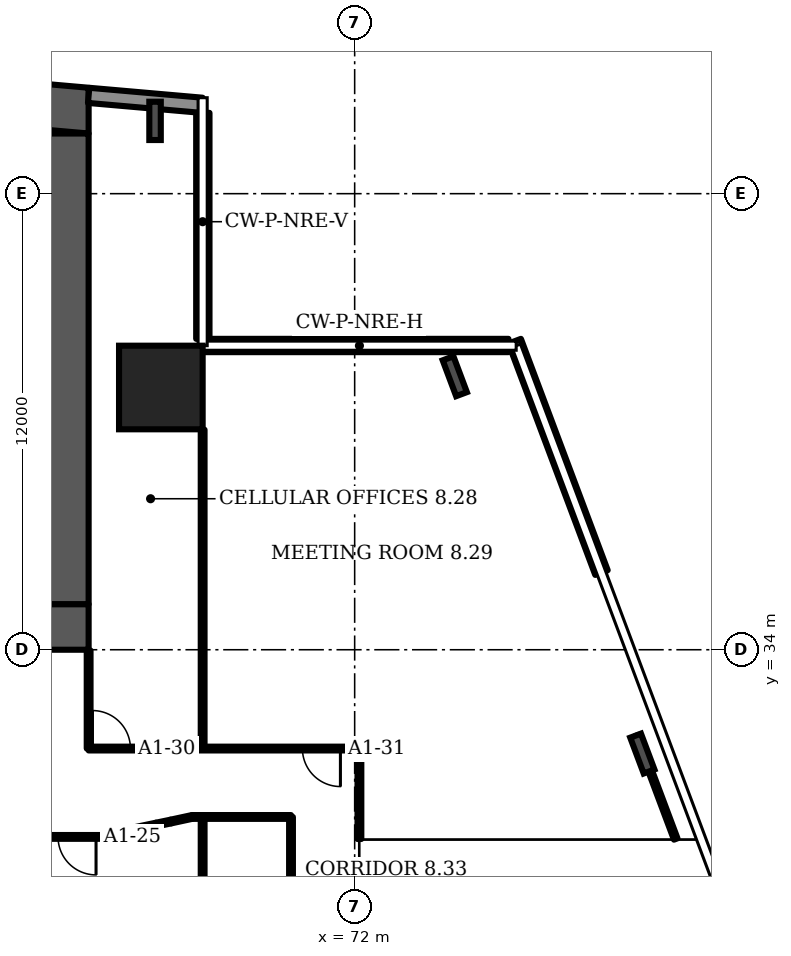
"""IFC4 building model, lengths in metres.
Left out: names, types, materials, properties, quantities, classifications, styles, units other than length and angle.
Written with IfcOpenShell. Run it as: python <this file> out.ifc"""

import sys

from ifc_helpers import new_model, si_unit, direction, frame, frame_2d, origin, origin_2d, place, context, subcontext, project, spatial, polyline, rectangle, i_section, outline, extrude, element, fill, save


model = new_model("IFC4")
c1 = context("Model", 3, precision=1e-05, world=origin(), true_north=direction((0.0, 1.0)))
c2 = subcontext(c1, "Body", "Model", "MODEL_VIEW")
j1 = project(units=[si_unit("LENGTHUNIT", "METRE"), si_unit("PLANEANGLEUNIT", "RADIAN")], contexts=[c1])
p1 = place(None, origin())
s1 = spatial("IfcSite", under=j1, at=p1, CompositionType="ELEMENT")
p2 = place(p1, origin())
s2 = spatial("IfcBuilding", under=s1, at=p2, CompositionType="ELEMENT")
p3 = place(p2, frame((0.0, 0.0, 48.7)))
s3 = spatial("IfcBuildingStorey", under=s2, at=p3, CompositionType="ELEMENT", Elevation=48.7)
p4 = place(p3, origin())
e1 = element("IfcWall", 1, at=p4, inside=s3, PredefinedType="SHEAR", context=c2, shape_type="SweptSolid", body=[
    extrude(outline(polyline([(9.0, 47.583), (37.0, 50.032), (65.0, 47.583), (65.0, 48.787), (37.0, 51.237), (9.0, 48.787), (9.0, 47.583)])), origin(), (0.0, 0.0, 1.0), 3.6),
])
p5 = place(p3, frame((9.0, 34.6, 0.0), z_axis=(0.0, 0.0, 1.0), x_axis=(1.0, 0.0, 0.0)))
e2 = element("IfcWall", 2, at=p5, inside=s3, PredefinedType="SHEAR", context=c2, shape_type="SweptSolid", body=[
    extrude(rectangle(XDim=56.0, YDim=1.2, at=frame_2d((28.0, 0.0))), origin(), (0.0, 0.0, 1.0), 3.6),
])
p6 = place(p5, frame((3.3, 0.0, 0.0)))
e3 = element("IfcOpeningElement", 3, at=p6, cuts=e2, PredefinedType="OPENING", context=c2, shape_type="SweptSolid", body=[
    extrude(rectangle(XDim=1.0, YDim=2.1, at=frame_2d((0.5, 1.05))), frame((0.0, 0.61, 0.0), z_axis=(0.0, -1.0, 0.0), x_axis=(1.0, 0.0, 0.0)), (0.0, 0.0, 1.0), 1.22),
])
p7 = place(p5, frame((7.867, 0.0, 0.0)))
e4 = element("IfcOpeningElement", 4, at=p7, cuts=e2, PredefinedType="OPENING", context=c2, shape_type="SweptSolid", body=[
    extrude(rectangle(XDim=1.1, YDim=2.1, at=frame_2d((0.55, 1.05))), frame((0.0, 0.61, 0.0), z_axis=(0.0, -1.0, 0.0), x_axis=(1.0, 0.0, 0.0)), (0.0, 0.0, 1.0), 1.22),
])
p8 = place(p5, frame((12.033, 0.0, 0.0)))
e5 = element("IfcOpeningElement", 5, at=p8, cuts=e2, PredefinedType="OPENING", context=c2, shape_type="SweptSolid", body=[
    extrude(rectangle(XDim=1.1, YDim=2.1, at=frame_2d((0.55, 1.05))), frame((0.0, 0.61, 0.0), z_axis=(0.0, -1.0, 0.0), x_axis=(1.0, 0.0, 0.0)), (0.0, 0.0, 1.0), 1.22),
])
p9 = place(p5, frame((9.8, 0.0, 0.0)))
e6 = element("IfcOpeningElement", 6, at=p9, cuts=e2, PredefinedType="OPENING", context=c2, shape_type="SweptSolid", body=[
    extrude(rectangle(XDim=1.4, YDim=2.1, at=frame_2d((0.7, 1.05))), frame((0.0, 0.61, 0.0), z_axis=(0.0, -1.0, 0.0), x_axis=(1.0, 0.0, 0.0)), (0.0, 0.0, 1.0), 1.22),
])
p10 = place(p5, frame((14.65, 0.0, 0.0)))
e7 = element("IfcOpeningElement", 7, at=p10, cuts=e2, PredefinedType="OPENING", context=c2, shape_type="SweptSolid", body=[
    extrude(rectangle(XDim=1.2, YDim=2.1, at=frame_2d((0.6, 1.05))), frame((0.0, 0.61, 0.0), z_axis=(0.0, -1.0, 0.0), x_axis=(1.0, 0.0, 0.0)), (0.0, 0.0, 1.0), 1.22),
])
p11 = place(p5, frame((21.867, 0.0, 0.0)))
e8 = element("IfcOpeningElement", 8, at=p11, cuts=e2, PredefinedType="OPENING", context=c2, shape_type="SweptSolid", body=[
    extrude(rectangle(XDim=1.1, YDim=2.1, at=frame_2d((0.55, 1.05))), frame((0.0, 0.61, 0.0), z_axis=(0.0, -1.0, 0.0), x_axis=(1.0, 0.0, 0.0)), (0.0, 0.0, 1.0), 1.22),
])
p12 = place(p5, frame((26.033, 0.0, 0.0)))
e9 = element("IfcOpeningElement", 9, at=p12, cuts=e2, PredefinedType="OPENING", context=c2, shape_type="SweptSolid", body=[
    extrude(rectangle(XDim=1.1, YDim=2.1, at=frame_2d((0.55, 1.05))), frame((0.0, 0.61, 0.0), z_axis=(0.0, -1.0, 0.0), x_axis=(1.0, 0.0, 0.0)), (0.0, 0.0, 1.0), 1.22),
])
p13 = place(p5, frame((23.8, 0.0, 0.0)))
e10 = element("IfcOpeningElement", 10, at=p13, cuts=e2, PredefinedType="OPENING", context=c2, shape_type="SweptSolid", body=[
    extrude(rectangle(XDim=1.4, YDim=2.1, at=frame_2d((0.7, 1.05))), frame((0.0, 0.61, 0.0), z_axis=(0.0, -1.0, 0.0), x_axis=(1.0, 0.0, 0.0)), (0.0, 0.0, 1.0), 1.22),
])
p14 = place(p5, frame((28.867, 0.0, 0.0)))
e11 = element("IfcOpeningElement", 11, at=p14, cuts=e2, PredefinedType="OPENING", context=c2, shape_type="SweptSolid", body=[
    extrude(rectangle(XDim=1.1, YDim=2.1, at=frame_2d((0.55, 1.05))), frame((0.0, 0.61, 0.0), z_axis=(0.0, -1.0, 0.0), x_axis=(1.0, 0.0, 0.0)), (0.0, 0.0, 1.0), 1.22),
])
p15 = place(p5, frame((33.033, 0.0, 0.0)))
e12 = element("IfcOpeningElement", 12, at=p15, cuts=e2, PredefinedType="OPENING", context=c2, shape_type="SweptSolid", body=[
    extrude(rectangle(XDim=1.1, YDim=2.1, at=frame_2d((0.55, 1.05))), frame((0.0, 0.61, 0.0), z_axis=(0.0, -1.0, 0.0), x_axis=(1.0, 0.0, 0.0)), (0.0, 0.0, 1.0), 1.22),
])
p16 = place(p5, frame((40.15, 0.0, 0.0)))
e13 = element("IfcOpeningElement", 13, at=p16, cuts=e2, PredefinedType="OPENING", context=c2, shape_type="SweptSolid", body=[
    extrude(rectangle(XDim=1.2, YDim=2.1, at=frame_2d((0.6, 1.05))), frame((0.0, 0.61, 0.0), z_axis=(0.0, -1.0, 0.0), x_axis=(1.0, 0.0, 0.0)), (0.0, 0.0, 1.0), 1.22),
])
p17 = place(p5, frame((44.8, 0.0, 0.0)))
e14 = element("IfcOpeningElement", 14, at=p17, cuts=e2, PredefinedType="OPENING", context=c2, shape_type="SweptSolid", body=[
    extrude(rectangle(XDim=1.4, YDim=2.1, at=frame_2d((0.7, 1.05))), frame((0.0, 0.61, 0.0), z_axis=(0.0, -1.0, 0.0), x_axis=(1.0, 0.0, 0.0)), (0.0, 0.0, 1.0), 1.22),
])
p18 = place(p5, frame((49.867, 0.0, 0.0)))
e15 = element("IfcOpeningElement", 15, at=p18, cuts=e2, PredefinedType="OPENING", context=c2, shape_type="SweptSolid", body=[
    extrude(rectangle(XDim=1.1, YDim=2.1, at=frame_2d((0.55, 1.05))), frame((0.0, 0.61, 0.0), z_axis=(0.0, -1.0, 0.0), x_axis=(1.0, 0.0, 0.0)), (0.0, 0.0, 1.0), 1.22),
])
p19 = place(p5, frame((53.5, 0.0, 0.0)))
e16 = element("IfcOpeningElement", 16, at=p19, cuts=e2, PredefinedType="OPENING", context=c2, shape_type="SweptSolid", body=[
    extrude(rectangle(XDim=1.1, YDim=2.1, at=frame_2d((0.55, 1.05))), frame((0.0, 0.61, 0.0), z_axis=(0.0, -1.0, 0.0), x_axis=(1.0, 0.0, 0.0)), (0.0, 0.0, 1.0), 1.22),
])
p20 = place(p5, frame((51.567, 0.0, 0.0)))
e17 = element("IfcOpeningElement", 17, at=p20, cuts=e2, PredefinedType="OPENING", context=c2, shape_type="SweptSolid", body=[
    extrude(rectangle(XDim=1.4, YDim=2.1, at=frame_2d((0.7, 1.05))), frame((0.0, 0.61, 0.0), z_axis=(0.0, -1.0, 0.0), x_axis=(1.0, 0.0, 0.0)), (0.0, 0.0, 1.0), 1.22),
])
p21 = place(p3, frame((64.4, 35.2, 0.0), z_axis=(0.0, 0.0, 1.0), x_axis=(0.0, 1.0, 0.0)))
e18 = element("IfcWall", 18, at=p21, inside=s3, PredefinedType="SHEAR", context=c2, shape_type="SweptSolid", body=[
    extrude(rectangle(XDim=12.383, YDim=1.2, at=frame_2d((6.191, 0.0))), origin(), (0.0, 0.0, 1.0), 3.6),
])
p22 = place(p3, frame((66.9, 40.9, 0.0), z_axis=(0.0, 0.0, 1.0), x_axis=(1.0, 0.0, 0.0)))
e19 = element("IfcColumn", 19, at=p22, inside=s3, PredefinedType="COLUMN", context=c2, shape_type="SweptSolid", body=[
    extrude(rectangle(XDim=2.2, YDim=2.2, at=origin_2d()), origin(), (0.0, 0.0, 1.0), 3.6),
])
for number, where, z_axis, x_axis in (
    (20, (79.57, 31.268, 0.0), (0.0, 0.0, 1.0), (0.936, 0.351, 0.0)),
    (21, (74.634, 41.196, 0.0), (0.0, 0.0, 1.0), (0.936, 0.351, 0.0)),
    (22, (66.748, 47.915, 0.0), (0.0, 0.0, 1.0), (1.0, 0.0, 0.0)),
):
    element("IfcColumn", number, at=place(p3, frame(where, z_axis=z_axis, x_axis=x_axis)), inside=s3, PredefinedType="COLUMN", context=c2, shape_type="SweptSolid", body=[
        extrude(i_section(OverallWidth=0.302, OverallDepth=1.008, WebThickness=0.021, FlangeThickness=0.04, FilletRadius=0.03, at=origin_2d()), origin(), (0.0, 0.0, 1.0), 3.6),
    ])
p23 = place(p3, frame((67.983, 48.326, 0.0), z_axis=(0.0, 0.0, 1.0), x_axis=(-0.996194, 0.087168, 0.0)))
e23 = element("IfcWall", 23, at=p23, inside=s3, PredefinedType="SOLIDWALL", context=c2, shape_type="SweptSolid", body=[
    extrude(rectangle(XDim=2.994, YDim=0.4, at=frame_2d((1.497, 0.0))), origin(), (0.0, 0.0, 1.0), 3.2),
])
p24 = place(p3, frame((78.494, 36.03, 0.0), z_axis=(0.0, 0.0, 1.0), x_axis=(-0.351108, 0.936338, 0.0)))
e24 = element("IfcWall", 24, at=p24, inside=s3, PredefinedType="SOLIDWALL", context=c2, shape_type="SweptSolid", body=[
    extrude(rectangle(XDim=6.503, YDim=0.35, at=frame_2d((3.251, 0.0))), origin(), (0.0, 0.0, 1.0), 1.0),
])
p25 = place(p3, frame((76.047, 42.005, 0.0), z_axis=(0.0, 0.0, 1.0), x_axis=(-1.0, 0.0, 0.0)))
e25 = element("IfcWall", 25, at=p25, inside=s3, PredefinedType="SOLIDWALL", context=c2, shape_type="SweptSolid", body=[
    extrude(rectangle(XDim=8.047, YDim=0.35, at=frame_2d((4.023, 0.0))), origin(), (0.0, 0.0, 1.0), 1.0),
])
p26 = place(p3, frame((68.005, 42.18, 0.0), z_axis=(0.0, 0.0, 1.0), x_axis=(0.0, 1.0, 0.0)))
e26 = element("IfcWall", 26, at=p26, inside=s3, PredefinedType="SOLIDWALL", context=c2, shape_type="SweptSolid", body=[
    extrude(rectangle(XDim=5.947, YDim=0.35, at=frame_2d((2.973, 0.0))), origin(), (0.0, 0.0, 1.0), 1.0),
])
p27 = place(p3, frame((63.575, 29.075, 0.0), z_axis=(0.0, 0.0, 1.0), x_axis=(1.0, 0.0, 0.0)))
e27 = element("IfcWall", 27, at=p27, inside=s3, PredefinedType="PARTITIONING", context=c2, shape_type="SweptSolid", body=[
    extrude(rectangle(XDim=2.08, YDim=0.1, at=frame_2d((1.04, 0.0))), origin(), (0.0, 0.0, 1.0), 3.2),
])
p28 = place(p27, frame((0.62, 0.0, 0.0)))
e28 = element("IfcOpeningElement", 28, at=p28, cuts=e27, PredefinedType="OPENING", context=c2, shape_type="SweptSolid", body=[
    extrude(rectangle(XDim=1.0, YDim=2.1, at=frame_2d((0.5, 1.05))), frame((0.0, 0.06, 0.0), z_axis=(0.0, -1.0, 0.0), x_axis=(1.0, 0.0, 0.0)), (0.0, 0.0, 1.0), 0.12),
])
p29 = place(p3, frame((65.0, 31.4, 0.0), z_axis=(0.0, 0.0, 1.0), x_axis=(0.0, 1.0, 0.0)))
e29 = element("IfcWall", 29, at=p29, inside=s3, PredefinedType="PARTITIONING", context=c2, shape_type="SweptSolid", body=[
    extrude(rectangle(XDim=2.58, YDim=0.1, at=frame_2d((1.29, 0.0))), origin(), (0.0, 0.0, 1.0), 3.2),
])
p30 = place(p3, frame((65.0, 31.4, 0.0), z_axis=(0.0, 0.0, 1.0), x_axis=(1.0, 0.0, 0.0)))
e30 = element("IfcWall", 30, at=p30, inside=s3, PredefinedType="PARTITIONING", context=c2, shape_type="SweptSolid", body=[
    extrude(rectangle(XDim=7.125, YDim=0.1, at=frame_2d((3.562, 0.0))), origin(), (0.0, 0.0, 1.0), 3.2),
])
p31 = place(p30, frame((0.1, 0.0, 0.0)))
e31 = element("IfcOpeningElement", 31, at=p31, cuts=e30, PredefinedType="OPENING", context=c2, shape_type="SweptSolid", body=[
    extrude(rectangle(XDim=1.0, YDim=2.1, at=frame_2d((0.5, 1.05))), frame((0.0, 0.06, 0.0), z_axis=(0.0, -1.0, 0.0), x_axis=(1.0, 0.0, 0.0)), (0.0, 0.0, 1.0), 0.12),
])
p32 = place(p30, frame((5.625, 0.0, 0.0)))
e32 = element("IfcOpeningElement", 32, at=p32, cuts=e30, PredefinedType="OPENING", context=c2, shape_type="SweptSolid", body=[
    extrude(rectangle(XDim=1.0, YDim=2.1, at=frame_2d((0.5, 1.05))), frame((0.0, 0.06, 0.0), z_axis=(0.0, -1.0, 0.0), x_axis=(1.0, 0.0, 0.0)), (0.0, 0.0, 1.0), 0.12),
])
p33 = place(p3, frame((65.655, 29.075, 0.0), z_axis=(0.0, 0.0, 1.0), x_axis=(0.671773, 0.740757, 0.0)))
e33 = element("IfcWall", 33, at=p33, inside=s3, PredefinedType="PARTITIONING", context=c2, shape_type="SweptSolid", body=[
    extrude(rectangle(XDim=0.149, YDim=0.1, at=frame_2d((0.074, 0.0))), origin(), (0.0, 0.0, 1.0), 3.2),
])
p34 = place(p3, frame((65.755, 29.185, 0.0), z_axis=(0.0, 0.0, 1.0), x_axis=(0.978739, 0.205118, 0.0)))
e34 = element("IfcWall", 34, at=p34, inside=s3, PredefinedType="PARTITIONING", context=c2, shape_type="SweptSolid", body=[
    extrude(rectangle(XDim=1.047, YDim=0.1, at=frame_2d((0.524, 0.0))), origin(), (0.0, 0.0, 1.0), 3.2),
])
p35 = place(p3, frame((66.78, 29.4, 0.0), z_axis=(0.0, 0.0, 1.0), x_axis=(0.979048, 0.203632, 0.0)))
e35 = element("IfcWall", 35, at=p35, inside=s3, PredefinedType="PARTITIONING", context=c2, shape_type="SweptSolid", body=[
    extrude(rectangle(XDim=0.393, YDim=0.1, at=frame_2d((0.197, 0.0))), origin(), (0.0, 0.0, 1.0), 3.2),
])
p36 = place(p3, frame((67.165, 29.48, 0.0), z_axis=(0.0, 0.0, 1.0), x_axis=(0.977367, 0.211555, 0.0)))
e36 = element("IfcWall", 36, at=p36, inside=s3, PredefinedType="PARTITIONING", context=c2, shape_type="SweptSolid", body=[
    extrude(rectangle(XDim=0.568, YDim=0.1, at=frame_2d((0.284, 0.0))), origin(), (0.0, 0.0, 1.0), 3.2),
])
p37 = place(p3, frame((67.72, 29.6, 0.0), z_axis=(0.0, 0.0, 1.0), x_axis=(1.0, 0.0, 0.0)))
e37 = element("IfcWall", 37, at=p37, inside=s3, PredefinedType="PARTITIONING", context=c2, shape_type="SweptSolid", body=[
    extrude(rectangle(XDim=2.605, YDim=0.1, at=frame_2d((1.302, 0.0))), origin(), (0.0, 0.0, 1.0), 3.2),
])
p38 = place(p3, frame((68.0, 14.24, 0.0), z_axis=(0.0, 0.0, 1.0), x_axis=(0.0, 1.0, 0.0)))
e38 = element("IfcWall", 38, at=p38, inside=s3, PredefinedType="PARTITIONING", context=c2, shape_type="SweptSolid", body=[
    extrude(rectangle(XDim=15.36, YDim=0.1, at=frame_2d((7.68, 0.0))), origin(), (0.0, 0.0, 1.0), 3.2),
])
p39 = place(p3, frame((68.0, 31.4, 0.0), z_axis=(0.0, 0.0, 1.0), x_axis=(0.0, 1.0, 0.0)))
e39 = element("IfcWall", 39, at=p39, inside=s3, PredefinedType="PARTITIONING", context=c2, shape_type="SweptSolid", body=[
    extrude(rectangle(XDim=8.39, YDim=0.1, at=frame_2d((4.195, 0.0))), origin(), (0.0, 0.0, 1.0), 3.2),
])
p40 = place(p3, frame((70.325, 24.6, 0.0), z_axis=(0.0, 0.0, 1.0), x_axis=(0.0, 1.0, 0.0)))
e40 = element("IfcWall", 40, at=p40, inside=s3, PredefinedType="PARTITIONING", context=c2, shape_type="SweptSolid", body=[
    extrude(rectangle(XDim=5.0, YDim=0.1, at=frame_2d((2.5, 0.0))), origin(), (0.0, 0.0, 1.0), 3.2),
])
p41 = place(p3, frame((72.125, 29.02, 0.0), z_axis=(0.0, 0.0, 1.0), x_axis=(0.0, 1.0, 0.0)))
e41 = element("IfcWall", 41, at=p41, inside=s3, PredefinedType="PARTITIONING", context=c2, shape_type="SweptSolid", body=[
    extrude(rectangle(XDim=2.38, YDim=0.1, at=frame_2d((1.19, 0.0))), origin(), (0.0, 0.0, 1.0), 3.2),
])
p42 = place(p3, frame((80.448, 29.02, 0.0), z_axis=(0.0, 0.0, 1.0), x_axis=(-0.35129, 0.93627, 0.0)))
e42 = element("IfcWall", 42, at=p42, inside=s3, PredefinedType="PARTITIONING", context=c2, shape_type="SweptSolid", body=[
    extrude(rectangle(XDim=2.911, YDim=0.1, at=frame_2d((1.455, 0.0))), origin(), (0.0, 0.0, 1.0), 2.58),
])
p43 = place(p28, origin())
e43 = element("IfcDoor", 43, at=p43, inside=s3, OperationType="SINGLE_SWING_RIGHT", PredefinedType="DOOR", context=c2, shape_type="SweptSolid", body=[
    extrude(rectangle(XDim=1.0, YDim=2.1, at=frame_2d((0.5, 1.05))), frame((0.0, 0.025, 0.0), z_axis=(0.0, -1.0, 0.0), x_axis=(1.0, 0.0, 0.0)), (0.0, 0.0, 1.0), 0.05),
])
fill(e28, e43)
p44 = place(p31, origin())
e44 = element("IfcDoor", 44, at=p44, inside=s3, OperationType="SINGLE_SWING_LEFT", PredefinedType="DOOR", context=c2, shape_type="SweptSolid", body=[
    extrude(rectangle(XDim=1.0, YDim=2.1, at=frame_2d((0.5, 1.05))), frame((0.0, 0.025, 0.0), z_axis=(0.0, -1.0, 0.0), x_axis=(1.0, 0.0, 0.0)), (0.0, 0.0, 1.0), 0.05),
])
fill(e31, e44)
p45 = place(p32, origin())
e45 = element("IfcDoor", 45, at=p45, inside=s3, OperationType="SINGLE_SWING_RIGHT", PredefinedType="DOOR", context=c2, shape_type="SweptSolid", body=[
    extrude(rectangle(XDim=1.0, YDim=2.1, at=frame_2d((0.5, 1.05))), frame((0.0, 0.025, 0.0), z_axis=(0.0, -1.0, 0.0), x_axis=(1.0, 0.0, 0.0)), (0.0, 0.0, 1.0), 0.05),
])
fill(e32, e45)
save(model, sys.argv[1])
